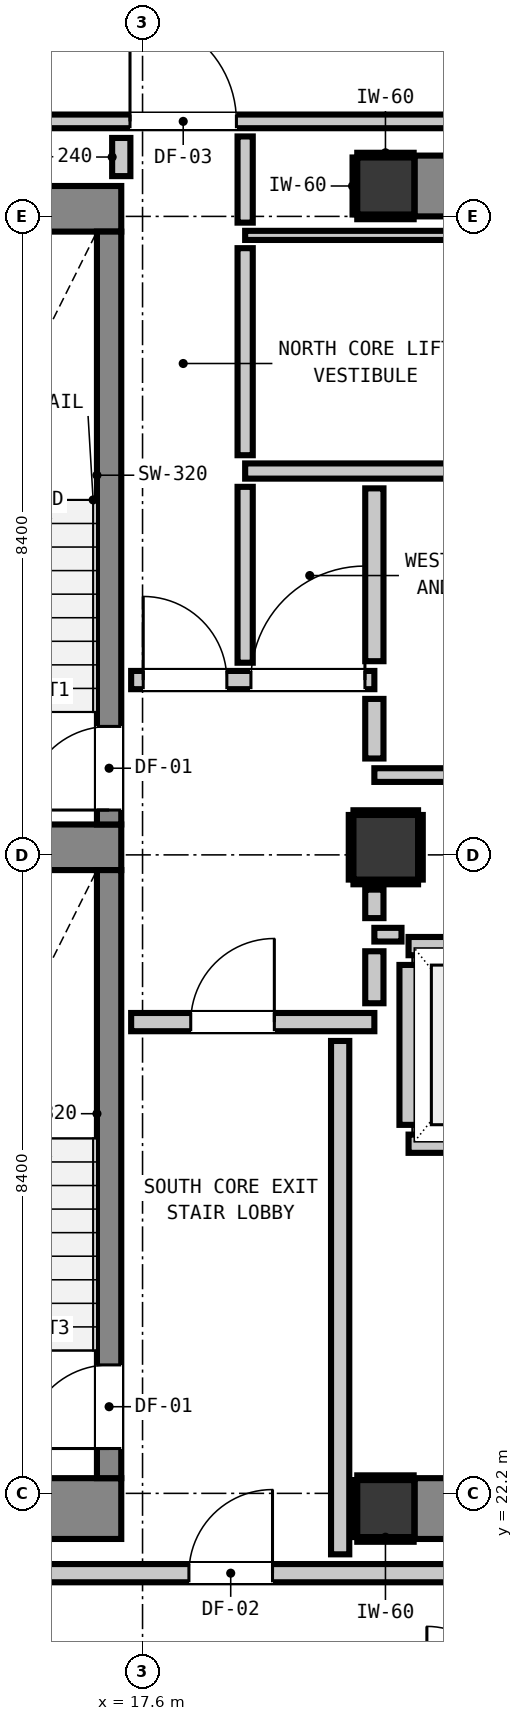
"""IFC4 building model, lengths in metres.
Left out: names, types, materials, properties, quantities, classifications, styles, units other than length and angle.
Written with IfcOpenShell. Run it as: python <this file> out.ifc"""

import sys

from ifc_helpers import new_model, si_unit, direction, frame, frame_2d, origin, origin_2d, place, context, subcontext, project, spatial, rectangle, extrude, element, fill, save


model = new_model("IFC4")
c1 = context("Model", 3, precision=1e-05, world=origin(), true_north=direction((0.0, 1.0)))
c2 = subcontext(c1, "Body", "Model", "MODEL_VIEW")
j1 = project(units=[si_unit("LENGTHUNIT", "METRE"), si_unit("PLANEANGLEUNIT", "RADIAN")], contexts=[c1])
p1 = place(None, origin())
s1 = spatial("IfcSite", under=j1, at=p1, CompositionType="ELEMENT")
p2 = place(p1, origin())
s2 = spatial("IfcBuilding", under=s1, at=p2, CompositionType="ELEMENT")
p3 = place(p2, frame((0.0, 0.0, 262.24)))
s3 = spatial("IfcBuildingStorey", under=s2, at=p3, CompositionType="ELEMENT", Elevation=262.24)
for number, where, z_axis, x_axis in (
    (1, (20.8, 22.0, 0.0), (0.0, 0.0, 1.0), (1.0, 0.0, 0.0)),
    (2, (20.8, 39.4, 0.0), (0.0, 0.0, 1.0), (1.0, 0.0, 0.0)),
):
    element("IfcColumn", number, at=place(p3, frame(where, z_axis=z_axis, x_axis=x_axis)), inside=s3, PredefinedType="COLUMN", context=c2, shape_type="SweptSolid", body=[
        extrude(rectangle(XDim=0.75, YDim=0.75, at=origin_2d()), origin(), (0.0, 0.0, 1.0), 3.32),
    ])
p4 = place(p3, frame((13.24, 22.0, 0.0), z_axis=(0.0, 0.0, 1.0), x_axis=(1.0, 0.0, 0.0)))
e3 = element("IfcWall", 3, at=p4, inside=s3, PredefinedType="SHEAR", context=c2, shape_type="SweptSolid", body=[
    extrude(rectangle(XDim=4.08, YDim=0.8, at=frame_2d((2.04, 0.0))), origin(), (0.0, 0.0, 1.0), 3.32),
])
p5 = place(p3, frame((13.24, 39.1, 0.0), z_axis=(0.0, 0.0, 1.0), x_axis=(1.0, 0.0, 0.0)))
e4 = element("IfcWall", 4, at=p5, inside=s3, PredefinedType="SHEAR", context=c2, shape_type="SweptSolid", body=[
    extrude(rectangle(XDim=4.08, YDim=0.6, at=frame_2d((2.04, 0.0))), origin(), (0.0, 0.0, 1.0), 3.32),
])
p6 = place(p3, frame((13.78, 30.7, 0.0), z_axis=(0.0, 0.0, 1.0), x_axis=(1.0, 0.0, 0.0)))
e5 = element("IfcWall", 5, at=p6, inside=s3, PredefinedType="SHEAR", context=c2, shape_type="SweptSolid", body=[
    extrude(rectangle(XDim=3.54, YDim=0.6, at=frame_2d((1.77, 0.0))), origin(), (0.0, 0.0, 1.0), 3.32),
])
for number, where, z_axis, x_axis in (
    (6, (21.18, 22.0, 0.0), (0.0, 0.0, 1.0), (1.0, 0.0, 0.0)),
    (7, (21.18, 39.4, 0.0), (0.0, 0.0, 1.0), (1.0, 0.0, 0.0)),
):
    element("IfcWall", number, at=place(p3, frame(where, z_axis=z_axis, x_axis=x_axis)), inside=s3, PredefinedType="SHEAR", context=c2, shape_type="SweptSolid", body=[
        extrude(rectangle(XDim=7.64, YDim=0.8, at=frame_2d((3.82, 0.0))), origin(), (0.0, 0.0, 1.0), 3.32),
    ])
p7 = place(p3, frame((17.16, 31.0, 0.0), z_axis=(0.0, 0.0, 1.0), x_axis=(0.0, 1.0, 0.0)))
e8 = element("IfcWall", 8, at=p7, inside=s3, PredefinedType="SHEAR", context=c2, shape_type="SweptSolid", body=[
    extrude(rectangle(XDim=7.8, YDim=0.32, at=frame_2d((3.9, 0.0))), origin(), (0.0, 0.0, 1.0), 3.32),
])
p8 = place(p7, frame((0.19, 0.0, 0.0)))
e9 = element("IfcOpeningElement", 9, at=p8, cuts=e8, PredefinedType="OPENING", context=c2, shape_type="SweptSolid", body=[
    extrude(rectangle(XDim=1.1, YDim=2.15, at=frame_2d((0.55, 1.075))), frame((0.0, 0.17, 0.0), z_axis=(0.0, -1.0, 0.0), x_axis=(1.0, 0.0, 0.0)), (0.0, 0.0, 1.0), 0.34),
])
p9 = place(p3, frame((17.16, 22.4, 0.0), z_axis=(0.0, 0.0, 1.0), x_axis=(0.0, 1.0, 0.0)))
e10 = element("IfcWall", 10, at=p9, inside=s3, PredefinedType="SHEAR", context=c2, shape_type="SweptSolid", body=[
    extrude(rectangle(XDim=8.0, YDim=0.32, at=frame_2d((4.0, 0.0))), origin(), (0.0, 0.0, 1.0), 3.32),
])
p10 = place(p9, frame((0.39, 0.0, 0.0)))
e11 = element("IfcOpeningElement", 11, at=p10, cuts=e10, PredefinedType="OPENING", context=c2, shape_type="SweptSolid", body=[
    extrude(rectangle(XDim=1.1, YDim=2.15, at=frame_2d((0.55, 1.075))), frame((0.0, 0.17, 0.0), z_axis=(0.0, -1.0, 0.0), x_axis=(1.0, 0.0, 0.0)), (0.0, 0.0, 1.0), 0.34),
])
p11 = place(p3, frame((20.8, 30.7, 0.0), z_axis=(0.0, 0.0, 1.0), x_axis=(1.0, 0.0, 0.0)))
e12 = element("IfcColumn", 12, at=p11, inside=s3, PredefinedType="COLUMN", context=c2, shape_type="SweptSolid", body=[
    extrude(rectangle(XDim=0.85, YDim=0.85, at=origin_2d()), origin(), (0.0, 0.0, 1.0), 3.32),
])
for number, where, z_axis, x_axis in (
    (13, (21.1, 26.8, 0.0), (0.0, 0.0, 1.0), (1.0, 0.0, 0.0)),
    (14, (21.1, 29.4, 0.0), (0.0, 0.0, 1.0), (1.0, 0.0, 0.0)),
):
    element("IfcWall", number, at=place(p3, frame(where, z_axis=z_axis, x_axis=x_axis)), inside=s3, PredefinedType="PARTITIONING", context=c2, shape_type="SweptSolid", body=[
        extrude(rectangle(XDim=2.2, YDim=0.24, at=frame_2d((1.1, 0.0))), origin(), (0.0, 0.0, 1.0), 3.1),
    ])
p12 = place(p3, frame((21.1, 27.048, 0.0), z_axis=(0.0, 0.0, 1.0), x_axis=(0.0, 1.0, 0.0)))
e15 = element("IfcWall", 15, at=p12, inside=s3, PredefinedType="PARTITIONING", context=c2, shape_type="SweptSolid", body=[
    extrude(rectangle(XDim=2.104, YDim=0.24, at=frame_2d((1.052, 0.0))), origin(), (0.0, 0.0, 1.0), 2.335),
])
p13 = place(p3, frame((13.012, 21.15, 0.0), z_axis=(0.0, 0.0, 1.0), x_axis=(1.0, 0.0, 0.0)))
e16 = element("IfcWall", 16, at=p13, inside=s3, PredefinedType="PARTITIONING", context=c2, shape_type="SweptSolid", body=[
    extrude(rectangle(XDim=28.201, YDim=0.24, at=frame_2d((14.101, 0.0))), origin(), (0.0, 0.0, 1.0), 3.1),
])
p14 = place(p13, frame((5.198, 0.0, 0.0)))
e17 = element("IfcOpeningElement", 17, at=p14, cuts=e16, PredefinedType="OPENING", context=c2, shape_type="SweptSolid", body=[
    extrude(rectangle(XDim=1.1, YDim=2.15, at=frame_2d((0.55, 1.075))), frame((0.0, 0.13, 0.0), z_axis=(0.0, -1.0, 0.0), x_axis=(1.0, 0.0, 0.0)), (0.0, 0.0, 1.0), 0.26),
])
p15 = place(p3, frame((17.45, 28.4, 0.0), z_axis=(0.0, 0.0, 1.0), x_axis=(1.0, 0.0, 0.0)))
e18 = element("IfcWall", 18, at=p15, inside=s3, PredefinedType="PARTITIONING", context=c2, shape_type="SweptSolid", body=[
    extrude(rectangle(XDim=3.2, YDim=0.24, at=frame_2d((1.6, 0.0))), origin(), (0.0, 0.0, 1.0), 3.1),
])
p16 = place(p15, frame((0.784, 0.0, 0.0)))
e19 = element("IfcOpeningElement", 19, at=p16, cuts=e18, PredefinedType="OPENING", context=c2, shape_type="SweptSolid", body=[
    extrude(rectangle(XDim=1.1, YDim=2.15, at=frame_2d((0.55, 1.075))), frame((0.0, 0.13, 0.0), z_axis=(0.0, -1.0, 0.0), x_axis=(1.0, 0.0, 0.0)), (0.0, 0.0, 1.0), 0.26),
])
p17 = place(p3, frame((17.45, 32.9, 0.0), z_axis=(0.0, 0.0, 1.0), x_axis=(1.0, 0.0, 0.0)))
e20 = element("IfcWall", 20, at=p17, inside=s3, PredefinedType="PARTITIONING", context=c2, shape_type="SweptSolid", body=[
    extrude(rectangle(XDim=3.2, YDim=0.24, at=frame_2d((1.6, 0.0))), origin(), (0.0, 0.0, 1.0), 3.1),
])
p18 = place(p17, frame((0.159, 0.0, 0.0)))
e21 = element("IfcOpeningElement", 21, at=p18, cuts=e20, PredefinedType="OPENING", context=c2, shape_type="SweptSolid", body=[
    extrude(rectangle(XDim=1.1, YDim=2.15, at=frame_2d((0.55, 1.075))), frame((0.0, 0.13, 0.0), z_axis=(0.0, -1.0, 0.0), x_axis=(1.0, 0.0, 0.0)), (0.0, 0.0, 1.0), 0.26),
])
p19 = place(p17, frame((1.576, 0.0, 0.0)))
e22 = element("IfcOpeningElement", 22, at=p19, cuts=e20, PredefinedType="OPENING", context=c2, shape_type="SweptSolid", body=[
    extrude(rectangle(XDim=1.5, YDim=2.15, at=frame_2d((0.75, 1.075))), frame((0.0, 0.13, 0.0), z_axis=(0.0, -1.0, 0.0), x_axis=(1.0, 0.0, 0.0)), (0.0, 0.0, 1.0), 0.26),
])
p20 = place(p3, frame((18.95, 35.65, 0.0), z_axis=(0.0, 0.0, 1.0), x_axis=(1.0, 0.0, 0.0)))
e23 = element("IfcWall", 23, at=p20, inside=s3, PredefinedType="PARTITIONING", context=c2, shape_type="SweptSolid", body=[
    extrude(rectangle(XDim=11.025, YDim=0.2, at=frame_2d((5.513, 0.0))), origin(), (0.0, 0.0, 1.0), 3.1),
])
p21 = place(p20, frame((9.749, 0.0, 0.0)))
e24 = element("IfcOpeningElement", 24, at=p21, cuts=e23, PredefinedType="OPENING", context=c2, shape_type="SweptSolid", body=[
    extrude(rectangle(XDim=0.9, YDim=2.1, at=frame_2d((0.45, 1.05))), frame((0.0, 0.11, 0.0), z_axis=(0.0, -1.0, 0.0), x_axis=(1.0, 0.0, 0.0)), (0.0, 0.0, 1.0), 0.22),
])
p22 = place(p3, frame((20.65, 29.55, 0.0), z_axis=(0.0, 0.0, 1.0), x_axis=(1.0, 0.0, 0.0)))
e25 = element("IfcWall", 25, at=p22, inside=s3, PredefinedType="PARTITIONING", context=c2, shape_type="SweptSolid", body=[
    extrude(rectangle(XDim=0.357, YDim=0.18, at=frame_2d((0.179, 0.0))), origin(), (0.0, 0.0, 1.0), 3.1),
])
p23 = place(p3, frame((20.65, 31.65, 0.0), z_axis=(0.0, 0.0, 1.0), x_axis=(1.0, 0.0, 0.0)))
e26 = element("IfcWall", 26, at=p23, inside=s3, PredefinedType="PARTITIONING", context=c2, shape_type="SweptSolid", body=[
    extrude(rectangle(XDim=7.7, YDim=0.18, at=frame_2d((3.85, 0.0))), origin(), (0.0, 0.0, 1.0), 3.1),
])
p24 = place(p23, frame((4.673, 0.0, 0.0)))
e27 = element("IfcOpeningElement", 27, at=p24, cuts=e26, PredefinedType="OPENING", context=c2, shape_type="SweptSolid", body=[
    extrude(rectangle(XDim=0.9, YDim=2.1, at=frame_2d((0.45, 1.05))), frame((0.0, 0.1, 0.0), z_axis=(0.0, -1.0, 0.0), x_axis=(1.0, 0.0, 0.0)), (0.0, 0.0, 1.0), 0.2),
])
p25 = place(p3, frame((4.587, 40.25, 0.0), z_axis=(0.0, 0.0, 1.0), x_axis=(1.0, 0.0, 0.0)))
e28 = element("IfcWall", 28, at=p25, inside=s3, PredefinedType="PARTITIONING", context=c2, shape_type="SweptSolid", body=[
    extrude(rectangle(XDim=36.626, YDim=0.18, at=frame_2d((18.313, 0.0))), origin(), (0.0, 0.0, 1.0), 3.1),
])
p26 = place(p25, frame((12.848, 0.0, 0.0)))
e29 = element("IfcOpeningElement", 29, at=p26, cuts=e28, PredefinedType="OPENING", context=c2, shape_type="SweptSolid", body=[
    extrude(rectangle(XDim=1.4, YDim=2.15, at=frame_2d((0.7, 1.075))), frame((0.0, 0.1, 0.0), z_axis=(0.0, -1.0, 0.0), x_axis=(1.0, 0.0, 0.0)), (0.0, 0.0, 1.0), 0.2),
])
p27 = place(p25, frame((3.362, 0.0, 0.0)))
e30 = element("IfcOpeningElement", 30, at=p27, cuts=e28, PredefinedType="OPENING", context=c2, shape_type="SweptSolid", body=[
    extrude(rectangle(XDim=0.9, YDim=2.1, at=frame_2d((0.45, 1.05))), frame((0.0, 0.1, 0.0), z_axis=(0.0, -1.0, 0.0), x_axis=(1.0, 0.0, 0.0)), (0.0, 0.0, 1.0), 0.2),
])
p28 = place(p3, frame((18.95, 38.75, 0.0), z_axis=(0.0, 0.0, 1.0), x_axis=(1.0, 0.0, 0.0)))
e31 = element("IfcWall", 31, at=p28, inside=s3, PredefinedType="PARTITIONING", context=c2, shape_type="SweptSolid", body=[
    extrude(rectangle(XDim=13.56, YDim=0.12, at=frame_2d((6.78, 0.0))), origin(), (0.0, 0.0, 1.0), 3.1),
])
p29 = place(p3, frame((17.32, 39.53, 0.0), z_axis=(0.0, 0.0, 1.0), x_axis=(0.0, 1.0, 0.0)))
e32 = element("IfcWall", 32, at=p29, inside=s3, PredefinedType="PARTITIONING", context=c2, shape_type="SweptSolid", body=[
    extrude(rectangle(XDim=0.502, YDim=0.24, at=frame_2d((0.251, 0.0))), origin(), (0.0, 0.0, 1.0), 3.1),
])
p30 = place(p3, frame((20.2, 21.398, 0.0), z_axis=(0.0, 0.0, 1.0), x_axis=(0.0, 1.0, 0.0)))
e33 = element("IfcWall", 33, at=p30, inside=s3, PredefinedType="PARTITIONING", context=c2, shape_type="SweptSolid", body=[
    extrude(rectangle(XDim=6.754, YDim=0.24, at=frame_2d((3.377, 0.0))), origin(), (0.0, 0.0, 1.0), 3.1),
])
p31 = place(p3, frame((20.65, 28.648, 0.0), z_axis=(0.0, 0.0, 1.0), x_axis=(0.0, 1.0, 0.0)))
e34 = element("IfcWall", 34, at=p31, inside=s3, PredefinedType="PARTITIONING", context=c2, shape_type="SweptSolid", body=[
    extrude(rectangle(XDim=0.684, YDim=0.24, at=frame_2d((0.342, 0.0))), origin(), (0.0, 0.0, 1.0), 2.335),
])
p32 = place(p3, frame((20.65, 29.768, 0.0), z_axis=(0.0, 0.0, 1.0), x_axis=(0.0, 1.0, 0.0)))
e35 = element("IfcWall", 35, at=p32, inside=s3, PredefinedType="PARTITIONING", context=c2, shape_type="SweptSolid", body=[
    extrude(rectangle(XDim=0.375, YDim=0.24, at=frame_2d((0.188, 0.0))), origin(), (0.0, 0.0, 1.0), 2.335),
])
p33 = place(p3, frame((20.65, 31.868, 0.0), z_axis=(0.0, 0.0, 1.0), x_axis=(0.0, 1.0, 0.0)))
e36 = element("IfcWall", 36, at=p33, inside=s3, PredefinedType="PARTITIONING", context=c2, shape_type="SweptSolid", body=[
    extrude(rectangle(XDim=0.784, YDim=0.24, at=frame_2d((0.392, 0.0))), origin(), (0.0, 0.0, 1.0), 2.335),
])
p34 = place(p3, frame((20.65, 33.148, 0.0), z_axis=(0.0, 0.0, 1.0), x_axis=(0.0, 1.0, 0.0)))
e37 = element("IfcWall", 37, at=p34, inside=s3, PredefinedType="PARTITIONING", context=c2, shape_type="SweptSolid", body=[
    extrude(rectangle(XDim=2.274, YDim=0.24, at=frame_2d((1.137, 0.0))), origin(), (0.0, 0.0, 1.0), 2.335),
])
p35 = place(p3, frame((18.95, 33.128, 0.0), z_axis=(0.0, 0.0, 1.0), x_axis=(0.0, 1.0, 0.0)))
e38 = element("IfcWall", 38, at=p35, inside=s3, PredefinedType="PARTITIONING", context=c2, shape_type="SweptSolid", body=[
    extrude(rectangle(XDim=2.314, YDim=0.2, at=frame_2d((1.157, 0.0))), origin(), (0.0, 0.0, 1.0), 3.1),
])
p36 = place(p3, frame((18.95, 35.858, 0.0), z_axis=(0.0, 0.0, 1.0), x_axis=(0.0, 1.0, 0.0)))
e39 = element("IfcWall", 39, at=p36, inside=s3, PredefinedType="PARTITIONING", context=c2, shape_type="SweptSolid", body=[
    extrude(rectangle(XDim=2.724, YDim=0.2, at=frame_2d((1.362, 0.0))), origin(), (0.0, 0.0, 1.0), 3.1),
])
p37 = place(p3, frame((18.95, 38.918, 0.0), z_axis=(0.0, 0.0, 1.0), x_axis=(0.0, 1.0, 0.0)))
e40 = element("IfcWall", 40, at=p37, inside=s3, PredefinedType="PARTITIONING", context=c2, shape_type="SweptSolid", body=[
    extrude(rectangle(XDim=1.134, YDim=0.2, at=frame_2d((0.567, 0.0))), origin(), (0.0, 0.0, 1.0), 3.1),
])
for number, where, z_axis, x_axis in (
    (41, (20.425, 21.593, 0.0), (0.0, 0.0, 1.0), (1.0, 0.0, 0.0)),
    (42, (20.425, 22.407, 0.0), (0.0, 0.0, 1.0), (1.0, 0.0, 0.0)),
):
    element("IfcWall", number, at=place(p3, frame(where, z_axis=z_axis, x_axis=x_axis)), inside=s3, PredefinedType="PARTITIONING", context=c2, shape_type="SweptSolid", body=[
        extrude(rectangle(XDim=0.742, YDim=0.06, at=frame_2d((0.371, 0.0))), origin(), (0.0, 0.0, 1.0), 1.45),
    ])
p38 = place(p3, frame((20.393, 21.625, 0.0), z_axis=(0.0, 0.0, 1.0), x_axis=(0.0, 1.0, 0.0)))
e43 = element("IfcWall", 43, at=p38, inside=s3, PredefinedType="PARTITIONING", context=c2, shape_type="SweptSolid", body=[
    extrude(rectangle(XDim=0.75, YDim=0.06, at=frame_2d((0.375, 0.0))), origin(), (0.0, 0.0, 1.0), 1.45),
])
for number, where, z_axis, x_axis in (
    (44, (20.425, 38.993, 0.0), (0.0, 0.0, 1.0), (1.0, 0.0, 0.0)),
    (45, (20.425, 39.807, 0.0), (0.0, 0.0, 1.0), (1.0, 0.0, 0.0)),
):
    element("IfcWall", number, at=place(p3, frame(where, z_axis=z_axis, x_axis=x_axis)), inside=s3, PredefinedType="PARTITIONING", context=c2, shape_type="SweptSolid", body=[
        extrude(rectangle(XDim=0.742, YDim=0.06, at=frame_2d((0.371, 0.0))), origin(), (0.0, 0.0, 1.0), 1.45),
    ])
p39 = place(p3, frame((20.393, 39.025, 0.0), z_axis=(0.0, 0.0, 1.0), x_axis=(0.0, 1.0, 0.0)))
e46 = element("IfcWall", 46, at=p39, inside=s3, PredefinedType="PARTITIONING", context=c2, shape_type="SweptSolid", body=[
    extrude(rectangle(XDim=0.75, YDim=0.06, at=frame_2d((0.375, 0.0))), origin(), (0.0, 0.0, 1.0), 1.45),
])
for number, where, z_axis, x_axis in (
    (47, (20.375, 30.243, 0.0), (0.0, 0.0, 1.0), (1.0, 0.0, 0.0)),
    (48, (20.375, 31.157, 0.0), (0.0, 0.0, 1.0), (1.0, 0.0, 0.0)),
    (49, (20.343, 30.275, 0.0), (0.0, 0.0, 1.0), (0.0, 1.0, 0.0)),
    (50, (21.257, 30.275, 0.0), (0.0, 0.0, 1.0), (0.0, 1.0, 0.0)),
):
    element("IfcWall", number, at=place(p3, frame(where, z_axis=z_axis, x_axis=x_axis)), inside=s3, PredefinedType="PARTITIONING", context=c2, shape_type="SweptSolid", body=[
        extrude(rectangle(XDim=0.85, YDim=0.06, at=frame_2d((0.425, 0.0))), origin(), (0.0, 0.0, 1.0), 1.45),
    ])
p40 = place(p8, origin())
e51 = element("IfcDoor", 51, at=p40, inside=s3, OperationType="SINGLE_SWING_LEFT", PredefinedType="DOOR", context=c2, shape_type="SweptSolid", body=[
    extrude(rectangle(XDim=1.1, YDim=2.15, at=frame_2d((0.55, 1.075))), frame((0.0, 0.025, 0.0), z_axis=(0.0, -1.0, 0.0), x_axis=(1.0, 0.0, 0.0)), (0.0, 0.0, 1.0), 0.05),
])
fill(e9, e51)
p41 = place(p10, origin())
e52 = element("IfcDoor", 52, at=p41, inside=s3, OperationType="SINGLE_SWING_LEFT", PredefinedType="DOOR", context=c2, shape_type="SweptSolid", body=[
    extrude(rectangle(XDim=1.1, YDim=2.15, at=frame_2d((0.55, 1.075))), frame((0.0, 0.025, 0.0), z_axis=(0.0, -1.0, 0.0), x_axis=(1.0, 0.0, 0.0)), (0.0, 0.0, 1.0), 0.05),
])
fill(e11, e52)
p42 = place(p16, origin())
e53 = element("IfcDoor", 53, at=p42, inside=s3, OperationType="SINGLE_SWING_RIGHT", PredefinedType="DOOR", context=c2, shape_type="SweptSolid", body=[
    extrude(rectangle(XDim=1.1, YDim=2.15, at=frame_2d((0.55, 1.075))), frame((0.0, 0.025, 0.0), z_axis=(0.0, -1.0, 0.0), x_axis=(1.0, 0.0, 0.0)), (0.0, 0.0, 1.0), 0.05),
])
fill(e19, e53)
p43 = place(p18, origin())
e54 = element("IfcDoor", 54, at=p43, inside=s3, OperationType="SINGLE_SWING_LEFT", PredefinedType="DOOR", context=c2, shape_type="SweptSolid", body=[
    extrude(rectangle(XDim=1.1, YDim=2.15, at=frame_2d((0.55, 1.075))), frame((0.0, 0.025, 0.0), z_axis=(0.0, -1.0, 0.0), x_axis=(1.0, 0.0, 0.0)), (0.0, 0.0, 1.0), 0.05),
])
fill(e21, e54)
p44 = place(p14, origin())
e55 = element("IfcDoor", 55, at=p44, inside=s3, OperationType="SINGLE_SWING_RIGHT", PredefinedType="DOOR", context=c2, shape_type="SweptSolid", body=[
    extrude(rectangle(XDim=1.1, YDim=2.15, at=frame_2d((0.55, 1.075))), frame((0.0, 0.025, 0.0), z_axis=(0.0, -1.0, 0.0), x_axis=(1.0, 0.0, 0.0)), (0.0, 0.0, 1.0), 0.05),
])
fill(e17, e55)
p45 = place(p26, origin())
e56 = element("IfcDoor", 56, at=p45, inside=s3, OperationType="SINGLE_SWING_LEFT", PredefinedType="DOOR", context=c2, shape_type="SweptSolid", body=[
    extrude(rectangle(XDim=1.4, YDim=2.15, at=frame_2d((0.7, 1.075))), frame((0.0, 0.025, 0.0), z_axis=(0.0, -1.0, 0.0), x_axis=(1.0, 0.0, 0.0)), (0.0, 0.0, 1.0), 0.05),
])
fill(e29, e56)
p46 = place(p19, origin())
e57 = element("IfcDoor", 57, at=p46, inside=s3, OperationType="SINGLE_SWING_RIGHT", PredefinedType="DOOR", context=c2, shape_type="SweptSolid", body=[
    extrude(rectangle(XDim=1.5, YDim=2.15, at=frame_2d((0.75, 1.075))), frame((0.0, 0.025, 0.0), z_axis=(0.0, -1.0, 0.0), x_axis=(1.0, 0.0, 0.0)), (0.0, 0.0, 1.0), 0.05),
])
fill(e22, e57)
save(model, sys.argv[1])
